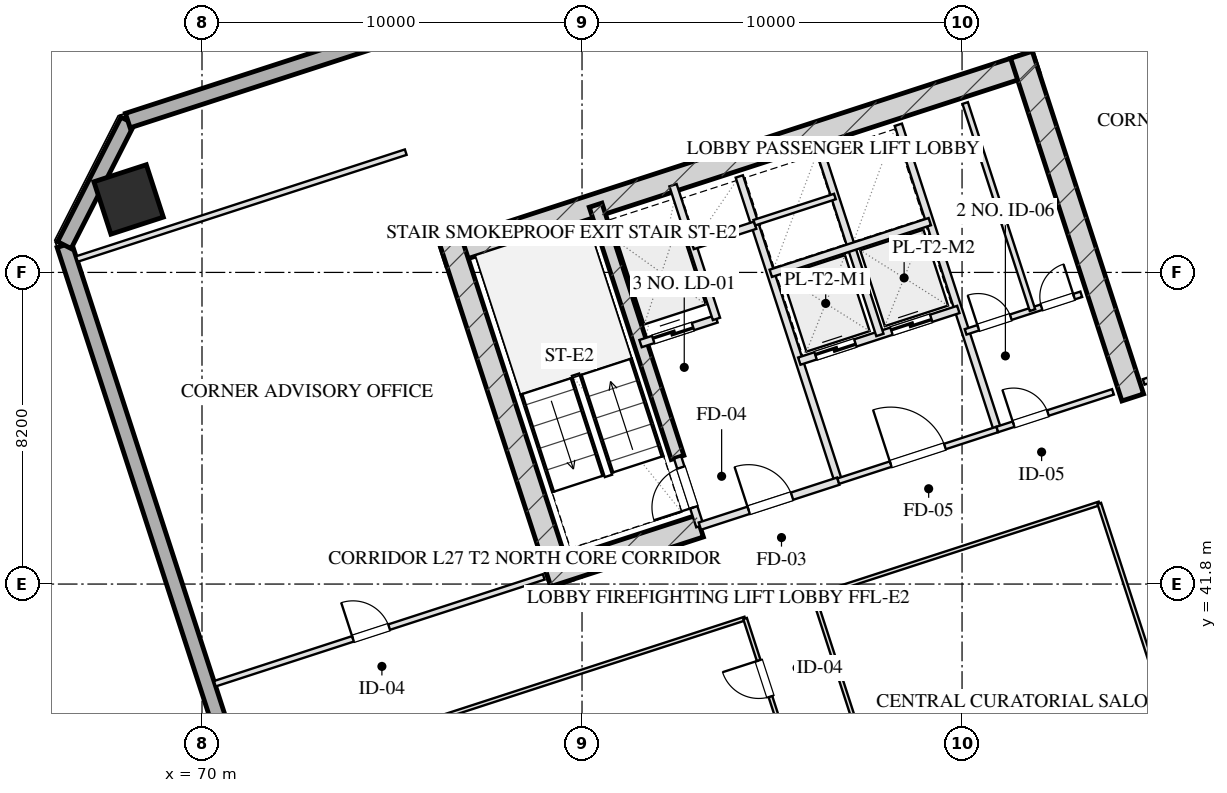
"""IFC4 building model, lengths in metres.
Left out: names, types, materials, properties, quantities, classifications, styles, units other than length and angle.
Written with IfcOpenShell. Run it as: python <this file> out.ifc"""

import sys

from ifc_helpers import new_model, si_unit, direction, frame, frame_2d, origin, origin_2d, place, context, subcontext, project, spatial, rectangle, hollow_rectangle, extrude, element, fill, save


model = new_model("IFC4")
c1 = context("Model", 3, precision=1e-05, world=origin(), true_north=direction((0.0, 1.0)))
c2 = subcontext(c1, "Body", "Model", "MODEL_VIEW")
j1 = project(units=[si_unit("LENGTHUNIT", "METRE"), si_unit("PLANEANGLEUNIT", "RADIAN")], contexts=[c1])
p1 = place(None, origin())
s1 = spatial("IfcSite", under=j1, at=p1, CompositionType="ELEMENT")
p2 = place(p1, origin())
s2 = spatial("IfcBuilding", under=s1, at=p2, CompositionType="ELEMENT")
p3 = place(p2, frame((0.0, 0.0, 106.95)))
s3 = spatial("IfcBuildingStorey", under=s2, at=p3, CompositionType="ELEMENT", Elevation=106.95)
p4 = place(p3, frame((76.344, 50.466, 0.0), z_axis=(0.0, 0.0, 1.0), x_axis=(0.951055727519, 0.309019421968, 0.0)))
e1 = element("IfcWall", 1, at=p4, inside=s3, PredefinedType="SHEAR", context=c2, shape_type="SweptSolid", body=[
    extrude(rectangle(XDim=16.4, YDim=0.6, at=frame_2d((8.2, 0.0))), origin(), (0.0, 0.0, 1.0), 3.45),
])
for number, where, z_axis, x_axis in (
    (2, (79.466, 41.828, 0.0), (0.0, 0.0, 1.0), (-0.309, 0.951, 0.0)),
    (3, (94.492, 46.71, 0.0), (0.0, 0.0, 1.0), (-0.309, 0.951, 0.0)),
):
    element("IfcWall", number, at=place(p3, frame(where, z_axis=z_axis, x_axis=x_axis)), inside=s3, PredefinedType="SHEAR", context=c2, shape_type="SweptSolid", body=[
        extrude(rectangle(XDim=9.48, YDim=0.6, at=frame_2d((4.74, 0.0))), origin(), (0.0, 0.0, 1.0), 3.45),
    ])
p5 = place(p3, frame((82.514, 45.131, 0.0), z_axis=(0.0, 0.0, 1.0), x_axis=(-0.308988790936, 0.951065679686, 0.0)))
e4 = element("IfcWall", 4, at=p5, inside=s3, PredefinedType="SHEAR", context=c2, shape_type="SweptSolid", body=[
    extrude(rectangle(XDim=6.98, YDim=0.35, at=frame_2d((3.49, 0.0))), origin(), (0.0, 0.0, 1.0), 3.45),
])
p6 = place(p3, frame((79.087, 42.021, 0.0), z_axis=(0.0, 0.0, 1.0), x_axis=(0.951062550203, 0.3089984233, 0.0)))
e5 = element("IfcWall", 5, at=p6, inside=s3, PredefinedType="SHEAR", context=c2, shape_type="SweptSolid", body=[
    extrude(rectangle(XDim=4.22, YDim=0.6, at=frame_2d((2.11, 0.0))), origin(), (0.0, 0.0, 1.0), 3.45),
])
p7 = place(p3, frame((68.069, 51.92, 0.0), z_axis=(0.0, 0.0, 1.0), x_axis=(0.951056516295, 0.309016994375, 0.0)))
e6 = element("IfcColumn", 6, at=p7, inside=s3, PredefinedType="COLUMN", context=c2, shape_type="SweptSolid", body=[
    extrude(hollow_rectangle(XDim=1.45, YDim=1.45, WallThickness=0.05, at=origin_2d()), origin(), (0.0, 0.0, 1.0), 3.451),
])
p8 = place(p3, frame((80.716, 6.59, 0.0), z_axis=(0.0, 0.0, 1.0), x_axis=(-0.309017542002, 0.95105633836, 0.0)))
e7 = element("IfcWall", 7, at=p8, inside=s3, PredefinedType="SOLIDWALL", context=c2, shape_type="SweptSolid", body=[
    extrude(rectangle(XDim=46.4, YDim=0.4, at=frame_2d((23.2, 0.0))), origin(), (0.0, 0.0, 1.0), 2.61),
])
p9 = place(p3, frame((66.377, 50.719, 0.0), z_axis=(0.0, 0.0, 1.0), x_axis=(0.454026238093, 0.890988313685, 0.0)))
e8 = element("IfcWall", 8, at=p9, inside=s3, PredefinedType="SOLIDWALL", context=c2, shape_type="SweptSolid", body=[
    extrude(rectangle(XDim=3.677, YDim=0.4, at=frame_2d((1.838, 0.0))), origin(), (0.0, 0.0, 1.0), 2.61),
])
p10 = place(p3, frame((68.047, 53.995, 0.0), z_axis=(0.0, 0.0, 1.0), x_axis=(0.95105505922, 0.309021478754, 0.0)))
e9 = element("IfcWall", 9, at=p10, inside=s3, PredefinedType="SOLIDWALL", context=c2, shape_type="SweptSolid", body=[
    extrude(rectangle(XDim=29.4, YDim=0.4, at=frame_2d((14.7, 0.0))), origin(), (0.0, 0.0, 1.0), 2.61),
])
p11 = place(p3, frame((83.101, 43.324, 0.0), z_axis=(0.0, 0.0, 1.0), x_axis=(-0.309048298632, 0.951046344356, 0.0)))
e10 = element("IfcWall", 10, at=p11, inside=s3, PredefinedType="PARTITIONING", context=c2, shape_type="SweptSolid", body=[
    extrude(rectangle(XDim=1.9, YDim=0.2, at=frame_2d((0.95, 0.0))), origin(), (0.0, 0.0, 1.0), 3.175),
])
p12 = place(p11, frame((0.52, 0.0, 0.0)))
e11 = element("IfcOpeningElement", 11, at=p12, cuts=e10, PredefinedType="OPENING", context=c2, shape_type="SweptSolid", body=[
    extrude(rectangle(XDim=1.1, YDim=2.05, at=frame_2d((0.55, 1.025))), frame((0.0, 0.11, 0.0), z_axis=(0.0, -1.0, 0.0), x_axis=(1.0, 0.0, 0.0)), (0.0, 0.0, 1.0), 0.22),
])
p13 = place(p3, frame((86.743, 44.508, 0.0), z_axis=(0.0, 0.0, 1.0), x_axis=(-0.309016001439, 0.951056838919, 0.0)))
e12 = element("IfcWall", 12, at=p13, inside=s3, PredefinedType="PARTITIONING", context=c2, shape_type="SweptSolid", body=[
    extrude(rectangle(XDim=8.43, YDim=0.2, at=frame_2d((4.215, 0.0))), origin(), (0.0, 0.0, 1.0), 3.175),
])
p14 = place(p3, frame((83.101, 43.324, 0.0), z_axis=(0.0, 0.0, 1.0), x_axis=(0.951052804469, 0.309028417967, 0.0)))
e13 = element("IfcWall", 13, at=p14, inside=s3, PredefinedType="PARTITIONING", context=c2, shape_type="SweptSolid", body=[
    extrude(rectangle(XDim=3.83, YDim=0.2, at=frame_2d((1.915, 0.0))), origin(), (0.0, 0.0, 1.0), 3.175),
])
p15 = place(p14, frame((1.35, 0.0, 0.0)))
e14 = element("IfcOpeningElement", 14, at=p15, cuts=e13, PredefinedType="OPENING", context=c2, shape_type="SweptSolid", body=[
    extrude(rectangle(XDim=1.2, YDim=2.05, at=frame_2d((0.6, 1.025))), frame((0.0, 0.11, 0.0), z_axis=(0.0, -1.0, 0.0), x_axis=(1.0, 0.0, 0.0)), (0.0, 0.0, 1.0), 0.22),
])
p16 = place(p3, frame((81.54, 48.127, 0.0), z_axis=(0.0, 0.0, 1.0), x_axis=(0.951062257173, 0.308999325213, 0.0)))
e15 = element("IfcWall", 15, at=p16, inside=s3, PredefinedType="PARTITIONING", context=c2, shape_type="SweptSolid", body=[
    extrude(rectangle(XDim=2.1, YDim=0.2, at=frame_2d((1.05, 0.0))), origin(), (0.0, 0.0, 1.0), 3.175),
])
p17 = place(p16, frame((0.35, 0.0, 0.0)))
e16 = element("IfcOpeningElement", 16, at=p17, cuts=e15, PredefinedType="OPENING", context=c2, shape_type="SweptSolid", body=[
    extrude(rectangle(XDim=1.1, YDim=2.05, at=frame_2d((0.55, 1.025))), frame((0.0, 0.11, 0.0), z_axis=(0.0, -1.0, 0.0), x_axis=(1.0, 0.0, 0.0)), (0.0, 0.0, 1.0), 0.22),
])
p18 = place(p3, frame((83.538, 48.776, 0.0), z_axis=(0.0, 0.0, 1.0), x_axis=(-0.3089935693, 0.951064127245, 0.0)))
e17 = element("IfcWall", 17, at=p18, inside=s3, PredefinedType="PARTITIONING", context=c2, shape_type="SweptSolid", body=[
    extrude(rectangle(XDim=3.7, YDim=0.2, at=frame_2d((1.85, 0.0))), origin(), (0.0, 0.0, 1.0), 3.175),
])
p19 = place(p3, frame((82.91, 50.707, 0.0), z_axis=(0.0, 0.0, 1.0), x_axis=(0.951041328149, 0.309063734775, 0.0)))
e18 = element("IfcWall", 18, at=p19, inside=s3, PredefinedType="PARTITIONING", context=c2, shape_type="SweptSolid", body=[
    extrude(rectangle(XDim=1.73, YDim=0.2, at=frame_2d((0.865, 0.0))), origin(), (0.0, 0.0, 1.0), 3.175),
])
p20 = place(p3, frame((90.928, 45.868, 0.0), z_axis=(0.0, 0.0, 1.0), x_axis=(-0.309042196757, 0.951048327176, 0.0)))
e19 = element("IfcWall", 19, at=p20, inside=s3, PredefinedType="PARTITIONING", context=c2, shape_type="SweptSolid", body=[
    extrude(rectangle(XDim=8.43, YDim=0.2, at=frame_2d((4.215, 0.0))), origin(), (0.0, 0.0, 1.0), 3.175),
])
p21 = place(p3, frame((86.743, 44.508, 0.0), z_axis=(0.0, 0.0, 1.0), x_axis=(0.951063829732, 0.308994485023, 0.0)))
e20 = element("IfcWall", 20, at=p21, inside=s3, PredefinedType="PARTITIONING", context=c2, shape_type="SweptSolid", body=[
    extrude(rectangle(XDim=4.4, YDim=0.15, at=frame_2d((2.2, 0.0))), origin(), (0.0, 0.0, 1.0), 3.175),
])
p22 = place(p21, frame((1.45, 0.0, 0.0)))
e21 = element("IfcOpeningElement", 21, at=p22, cuts=e20, PredefinedType="OPENING", context=c2, shape_type="SweptSolid", body=[
    extrude(rectangle(XDim=1.5, YDim=2.05, at=frame_2d((0.75, 1.025))), frame((0.0, 0.085, 0.0), z_axis=(0.0, -1.0, 0.0), x_axis=(1.0, 0.0, 0.0)), (0.0, 0.0, 1.0), 0.17),
])
p23 = place(p3, frame((85.718, 47.666, 0.0), z_axis=(0.0, 0.0, 1.0), x_axis=(0.951058531764, 0.30901079133, 0.0)))
e22 = element("IfcWall", 22, at=p23, inside=s3, PredefinedType="PARTITIONING", context=c2, shape_type="SweptSolid", body=[
    extrude(rectangle(XDim=4.4, YDim=0.2, at=frame_2d((2.2, 0.0))), origin(), (0.0, 0.0, 1.0), 3.175),
])
p24 = place(p23, frame((0.45, 0.0, 0.0)))
e23 = element("IfcOpeningElement", 23, at=p24, cuts=e22, PredefinedType="OPENING", context=c2, shape_type="SweptSolid", body=[
    extrude(rectangle(XDim=1.1, YDim=2.05, at=frame_2d((0.55, 1.025))), frame((0.0, 0.11, 0.0), z_axis=(0.0, -1.0, 0.0), x_axis=(1.0, 0.0, 0.0)), (0.0, 0.0, 1.0), 0.22),
])
p25 = place(p23, frame((2.55, 0.0, 0.0)))
e24 = element("IfcOpeningElement", 24, at=p25, cuts=e22, PredefinedType="OPENING", context=c2, shape_type="SweptSolid", body=[
    extrude(rectangle(XDim=1.1, YDim=2.05, at=frame_2d((0.55, 1.025))), frame((0.0, 0.11, 0.0), z_axis=(0.0, -1.0, 0.0), x_axis=(1.0, 0.0, 0.0)), (0.0, 0.0, 1.0), 0.22),
])
p26 = place(p3, frame((87.838, 48.354, 0.0), z_axis=(0.0, 0.0, 1.0), x_axis=(-0.3090093719, 0.951058992953, 0.0)))
e25 = element("IfcWall", 25, at=p26, inside=s3, PredefinedType="PARTITIONING", context=c2, shape_type="SweptSolid", body=[
    extrude(rectangle(XDim=5.11, YDim=0.2, at=frame_2d((2.555, 0.0))), origin(), (0.0, 0.0, 1.0), 3.175),
])
p27 = place(p3, frame((84.967, 49.977, 0.0), z_axis=(0.0, 0.0, 1.0), x_axis=(0.951063829732, 0.308994485023, 0.0)))
e26 = element("IfcWall", 26, at=p27, inside=s3, PredefinedType="PARTITIONING", context=c2, shape_type="SweptSolid", body=[
    extrude(rectangle(XDim=4.4, YDim=0.2, at=frame_2d((2.2, 0.0))), origin(), (0.0, 0.0, 1.0), 3.175),
])
p28 = place(p3, frame((84.534, 51.308, 0.0), z_axis=(0.0, 0.0, 1.0), x_axis=(0.951075093106, 0.308959814982, 0.0)))
e27 = element("IfcWall", 27, at=p28, inside=s3, PredefinedType="PARTITIONING", context=c2, shape_type="SweptSolid", body=[
    extrude(rectangle(XDim=2.23, YDim=0.15, at=frame_2d((1.115, 0.0))), origin(), (0.0, 0.0, 1.0), 3.175),
])
p29 = place(p3, frame((90.928, 45.868, 0.0), z_axis=(0.0, 0.0, 1.0), x_axis=(0.951059297078, 0.309008435874, 0.0)))
e28 = element("IfcWall", 28, at=p29, inside=s3, PredefinedType="PARTITIONING", context=c2, shape_type="SweptSolid", body=[
    extrude(rectangle(XDim=3.2, YDim=0.15, at=frame_2d((1.6, 0.0))), origin(), (0.0, 0.0, 1.0), 3.175),
])
p30 = place(p29, frame((0.45, 0.0, 0.0)))
e29 = element("IfcOpeningElement", 29, at=p30, cuts=e28, PredefinedType="OPENING", context=c2, shape_type="SweptSolid", body=[
    extrude(rectangle(XDim=0.95, YDim=2.05, at=frame_2d((0.475, 1.025))), frame((0.0, 0.085, 0.0), z_axis=(0.0, -1.0, 0.0), x_axis=(1.0, 0.0, 0.0)), (0.0, 0.0, 1.0), 0.17),
])
p31 = place(p3, frame((90.094, 48.436, 0.0), z_axis=(0.0, 0.0, 1.0), x_axis=(0.951066581729, 0.308986014439, 0.0)))
e30 = element("IfcWall", 30, at=p31, inside=s3, PredefinedType="PARTITIONING", context=c2, shape_type="SweptSolid", body=[
    extrude(rectangle(XDim=3.2, YDim=0.15, at=frame_2d((1.6, 0.0))), origin(), (0.0, 0.0, 1.0), 3.175),
])
p32 = place(p31, frame((0.35, 0.0, 0.0)))
e31 = element("IfcOpeningElement", 31, at=p32, cuts=e30, PredefinedType="OPENING", context=c2, shape_type="SweptSolid", body=[
    extrude(rectangle(XDim=0.9, YDim=2.05, at=frame_2d((0.45, 1.025))), frame((0.0, 0.085, 0.0), z_axis=(0.0, -1.0, 0.0), x_axis=(1.0, 0.0, 0.0)), (0.0, 0.0, 1.0), 0.17),
])
p33 = place(p31, frame((2.1, 0.0, 0.0)))
e32 = element("IfcOpeningElement", 32, at=p33, cuts=e30, PredefinedType="OPENING", context=c2, shape_type="SweptSolid", body=[
    extrude(rectangle(XDim=0.9, YDim=2.05, at=frame_2d((0.45, 1.025))), frame((0.0, 0.085, 0.0), z_axis=(0.0, -1.0, 0.0), x_axis=(1.0, 0.0, 0.0)), (0.0, 0.0, 1.0), 0.17),
])
p34 = place(p3, frame((91.853, 49.007, 0.0), z_axis=(0.0, 0.0, 1.0), x_axis=(-0.309022487551, 0.951054731437, 0.0)))
e33 = element("IfcWall", 33, at=p34, inside=s3, PredefinedType="PARTITIONING", context=c2, shape_type="SweptSolid", body=[
    extrude(rectangle(XDim=5.73, YDim=0.15, at=frame_2d((2.865, 0.0))), origin(), (0.0, 0.0, 1.0), 3.175),
])
p35 = place(p3, frame((66.707, 50.352, 0.0), z_axis=(0.0, 0.0, 1.0), x_axis=(0.951057133767, 0.309015093986, 0.0)))
e34 = element("IfcWall", 34, at=p35, inside=s3, PredefinedType="PARTITIONING", context=c2, shape_type="SweptSolid", body=[
    extrude(rectangle(XDim=9.1, YDim=0.15, at=frame_2d((4.55, 0.0))), origin(), (0.0, 0.0, 1.0), 3.175),
])
p36 = place(p3, frame((70.338, 39.177, 0.0), z_axis=(0.0, 0.0, 1.0), x_axis=(0.951059695568, 0.309007209409, 0.0)))
e35 = element("IfcWall", 35, at=p36, inside=s3, PredefinedType="PARTITIONING", context=c2, shape_type="SweptSolid", body=[
    extrude(rectangle(XDim=9.1, YDim=0.15, at=frame_2d((4.55, 0.0))), origin(), (0.0, 0.0, 1.0), 3.175),
])
p37 = place(p36, frame((3.822, 0.0, 0.0)))
e36 = element("IfcOpeningElement", 36, at=p37, cuts=e35, PredefinedType="OPENING", context=c2, shape_type="SweptSolid", body=[
    extrude(rectangle(XDim=1.0, YDim=2.05, at=frame_2d((0.5, 1.025))), frame((0.0, 0.085, 0.0), z_axis=(0.0, -1.0, 0.0), x_axis=(1.0, 0.0, 0.0)), (0.0, 0.0, 1.0), 0.17),
])
p38 = place(p3, frame((94.78, 47.119, 0.0), z_axis=(0.0, 0.0, 1.0), x_axis=(0.951054329824, 0.309023723562, 0.0)))
e37 = element("IfcWall", 37, at=p38, inside=s3, PredefinedType="PARTITIONING", context=c2, shape_type="SweptSolid", body=[
    extrude(rectangle(XDim=8.5, YDim=0.15, at=frame_2d((4.25, 0.0))), origin(), (0.0, 0.0, 1.0), 3.175),
])
p39 = place(p38, frame((3.57, 0.0, 0.0)))
e38 = element("IfcOpeningElement", 38, at=p39, cuts=e37, PredefinedType="OPENING", context=c2, shape_type="SweptSolid", body=[
    extrude(rectangle(XDim=1.0, YDim=2.05, at=frame_2d((0.5, 1.025))), frame((0.0, 0.085, 0.0), z_axis=(0.0, -1.0, 0.0), x_axis=(1.0, 0.0, 0.0)), (0.0, 0.0, 1.0), 0.17),
])
p40 = place(p3, frame((71.166, 36.629, 0.0), z_axis=(0.0, 0.0, 1.0), x_axis=(0.951056688031, 0.309016465825, 0.0)))
e39 = element("IfcWall", 39, at=p40, inside=s3, PredefinedType="MOVABLE", context=c2, shape_type="SweptSolid", body=[
    extrude(rectangle(XDim=13.8, YDim=0.1, at=frame_2d((6.9, 0.0))), origin(), (0.0, 0.0, 1.0), 3.175),
])
p41 = place(p3, frame((86.097, 41.48, 0.0), z_axis=(0.0, 0.0, 1.0), x_axis=(0.951060182336, 0.309005711233, 0.0)))
e40 = element("IfcWall", 40, at=p41, inside=s3, PredefinedType="MOVABLE", context=c2, shape_type="SweptSolid", body=[
    extrude(rectangle(XDim=7.9, YDim=0.1, at=frame_2d((3.95, 0.0))), origin(), (0.0, 0.0, 1.0), 3.175),
])
p42 = place(p3, frame((89.433, 25.067, 0.0), z_axis=(0.0, 0.0, 1.0), x_axis=(-0.30901773025, 0.951056277195, 0.0)))
e41 = element("IfcWall", 41, at=p42, inside=s3, PredefinedType="MOVABLE", context=c2, shape_type="SweptSolid", body=[
    extrude(rectangle(XDim=16.64, YDim=0.1, at=frame_2d((8.32, 0.0))), origin(), (0.0, 0.0, 1.0), 3.175),
])
p43 = place(p42, frame((1.16, 0.0, 0.0)))
e42 = element("IfcOpeningElement", 42, at=p43, cuts=e41, PredefinedType="OPENING", context=c2, shape_type="SweptSolid", body=[
    extrude(rectangle(XDim=1.05, YDim=2.05, at=frame_2d((0.525, 1.025))), frame((0.0, 0.06, 0.0), z_axis=(0.0, -1.0, 0.0), x_axis=(1.0, 0.0, 0.0)), (0.0, 0.0, 1.0), 0.12),
])
p44 = place(p42, frame((6.16, 0.0, 0.0)))
e43 = element("IfcOpeningElement", 43, at=p44, cuts=e41, PredefinedType="OPENING", context=c2, shape_type="SweptSolid", body=[
    extrude(rectangle(XDim=1.0, YDim=2.05, at=frame_2d((0.5, 1.025))), frame((0.0, 0.06, 0.0), z_axis=(0.0, -1.0, 0.0), x_axis=(1.0, 0.0, 0.0)), (0.0, 0.0, 1.0), 0.12),
])
p45 = place(p42, frame((10.16, 0.0, 0.0)))
e44 = element("IfcOpeningElement", 44, at=p45, cuts=e41, PredefinedType="OPENING", context=c2, shape_type="SweptSolid", body=[
    extrude(rectangle(XDim=1.0, YDim=2.05, at=frame_2d((0.5, 1.025))), frame((0.0, 0.06, 0.0), z_axis=(0.0, -1.0, 0.0), x_axis=(1.0, 0.0, 0.0)), (0.0, 0.0, 1.0), 0.12),
])
p46 = place(p42, frame((14.48, 0.0, 0.0)))
e45 = element("IfcOpeningElement", 45, at=p46, cuts=e41, PredefinedType="OPENING", context=c2, shape_type="SweptSolid", body=[
    extrude(rectangle(XDim=1.0, YDim=2.05, at=frame_2d((0.5, 1.025))), frame((0.0, 0.06, 0.0), z_axis=(0.0, -1.0, 0.0), x_axis=(1.0, 0.0, 0.0)), (0.0, 0.0, 1.0), 0.12),
])
p47 = place(p3, frame((91.24, 25.655, 0.0), z_axis=(0.0, 0.0, 1.0), x_axis=(-0.30901773025, 0.951056277195, 0.0)))
e46 = element("IfcWall", 46, at=p47, inside=s3, PredefinedType="MOVABLE", context=c2, shape_type="SweptSolid", body=[
    extrude(rectangle(XDim=16.64, YDim=0.1, at=frame_2d((8.32, 0.0))), origin(), (0.0, 0.0, 1.0), 3.175),
])
p48 = place(p47, frame((3.204, 0.0, 0.0)))
e47 = element("IfcOpeningElement", 47, at=p48, cuts=e46, PredefinedType="OPENING", context=c2, shape_type="SweptSolid", body=[
    extrude(rectangle(XDim=1.1, YDim=2.05, at=frame_2d((0.55, 1.025))), frame((0.0, 0.06, 0.0), z_axis=(0.0, -1.0, 0.0), x_axis=(1.0, 0.0, 0.0)), (0.0, 0.0, 1.0), 0.12),
])
p49 = place(p47, frame((11.404, 0.0, 0.0)))
e48 = element("IfcOpeningElement", 48, at=p49, cuts=e46, PredefinedType="OPENING", context=c2, shape_type="SweptSolid", body=[
    extrude(rectangle(XDim=1.1, YDim=2.05, at=frame_2d((0.55, 1.025))), frame((0.0, 0.06, 0.0), z_axis=(0.0, -1.0, 0.0), x_axis=(1.0, 0.0, 0.0)), (0.0, 0.0, 1.0), 0.12),
])
p50 = place(p3, frame((98.753, 28.096, 0.0), z_axis=(0.0, 0.0, 1.0), x_axis=(-0.30901773025, 0.951056277195, 0.0)))
e49 = element("IfcWall", 49, at=p50, inside=s3, PredefinedType="MOVABLE", context=c2, shape_type="SweptSolid", body=[
    extrude(rectangle(XDim=16.64, YDim=0.1, at=frame_2d((8.32, 0.0))), origin(), (0.0, 0.0, 1.0), 3.175),
])
p51 = place(p12, origin())
e50 = element("IfcDoor", 50, at=p51, inside=s3, OperationType="SINGLE_SWING_LEFT", PredefinedType="DOOR", context=c2, shape_type="SweptSolid", body=[
    extrude(rectangle(XDim=1.1, YDim=2.05, at=frame_2d((0.55, 1.025))), frame((0.0, 0.025, 0.0), z_axis=(0.0, -1.0, 0.0), x_axis=(1.0, 0.0, 0.0)), (0.0, 0.0, 1.0), 0.05),
])
fill(e11, e50)
p52 = place(p15, origin())
e51 = element("IfcDoor", 51, at=p52, inside=s3, OperationType="SINGLE_SWING_LEFT", PredefinedType="DOOR", context=c2, shape_type="SweptSolid", body=[
    extrude(rectangle(XDim=1.2, YDim=2.05, at=frame_2d((0.6, 1.025))), frame((0.0, 0.025, 0.0), z_axis=(0.0, -1.0, 0.0), x_axis=(1.0, 0.0, 0.0)), (0.0, 0.0, 1.0), 0.05),
])
fill(e14, e51)
p53 = place(p17, origin())
e52 = element("IfcDoor", 52, at=p53, inside=s3, OperationType="DOUBLE_DOOR_SLIDING", PredefinedType="DOOR", context=c2, shape_type="SweptSolid", body=[
    extrude(rectangle(XDim=1.1, YDim=2.05, at=frame_2d((0.55, 1.025))), frame((0.0, 0.025, 0.0), z_axis=(0.0, -1.0, 0.0), x_axis=(1.0, 0.0, 0.0)), (0.0, 0.0, 1.0), 0.05),
])
fill(e16, e52)
p54 = place(p22, origin())
e53 = element("IfcDoor", 53, at=p54, inside=s3, OperationType="SINGLE_SWING_LEFT", PredefinedType="DOOR", context=c2, shape_type="SweptSolid", body=[
    extrude(rectangle(XDim=1.5, YDim=2.05, at=frame_2d((0.75, 1.025))), frame((0.0, 0.025, 0.0), z_axis=(0.0, -1.0, 0.0), x_axis=(1.0, 0.0, 0.0)), (0.0, 0.0, 1.0), 0.05),
])
fill(e21, e53)
p55 = place(p24, origin())
e54 = element("IfcDoor", 54, at=p55, inside=s3, OperationType="DOUBLE_DOOR_SLIDING", PredefinedType="DOOR", context=c2, shape_type="SweptSolid", body=[
    extrude(rectangle(XDim=1.1, YDim=2.05, at=frame_2d((0.55, 1.025))), frame((0.0, 0.025, 0.0), z_axis=(0.0, -1.0, 0.0), x_axis=(1.0, 0.0, 0.0)), (0.0, 0.0, 1.0), 0.05),
])
fill(e23, e54)
p56 = place(p25, origin())
e55 = element("IfcDoor", 55, at=p56, inside=s3, OperationType="DOUBLE_DOOR_SLIDING", PredefinedType="DOOR", context=c2, shape_type="SweptSolid", body=[
    extrude(rectangle(XDim=1.1, YDim=2.05, at=frame_2d((0.55, 1.025))), frame((0.0, 0.025, 0.0), z_axis=(0.0, -1.0, 0.0), x_axis=(1.0, 0.0, 0.0)), (0.0, 0.0, 1.0), 0.05),
])
fill(e24, e55)
p57 = place(p30, origin())
e56 = element("IfcDoor", 56, at=p57, inside=s3, OperationType="SINGLE_SWING_LEFT", PredefinedType="DOOR", context=c2, shape_type="SweptSolid", body=[
    extrude(rectangle(XDim=0.95, YDim=2.05, at=frame_2d((0.475, 1.025))), frame((0.0, 0.025, 0.0), z_axis=(0.0, -1.0, 0.0), x_axis=(1.0, 0.0, 0.0)), (0.0, 0.0, 1.0), 0.05),
])
fill(e29, e56)
p58 = place(p32, origin())
e57 = element("IfcDoor", 57, at=p58, inside=s3, OperationType="SINGLE_SWING_LEFT", PredefinedType="DOOR", context=c2, shape_type="SweptSolid", body=[
    extrude(rectangle(XDim=0.9, YDim=2.05, at=frame_2d((0.45, 1.025))), frame((0.0, 0.025, 0.0), z_axis=(0.0, -1.0, 0.0), x_axis=(1.0, 0.0, 0.0)), (0.0, 0.0, 1.0), 0.05),
])
fill(e31, e57)
p59 = place(p33, origin())
e58 = element("IfcDoor", 58, at=p59, inside=s3, OperationType="SINGLE_SWING_RIGHT", PredefinedType="DOOR", context=c2, shape_type="SweptSolid", body=[
    extrude(rectangle(XDim=0.9, YDim=2.05, at=frame_2d((0.45, 1.025))), frame((0.0, 0.025, 0.0), z_axis=(0.0, -1.0, 0.0), x_axis=(1.0, 0.0, 0.0)), (0.0, 0.0, 1.0), 0.05),
])
fill(e32, e58)
p60 = place(p37, origin())
e59 = element("IfcDoor", 59, at=p60, inside=s3, OperationType="SINGLE_SWING_LEFT", PredefinedType="DOOR", context=c2, shape_type="SweptSolid", body=[
    extrude(rectangle(XDim=1.0, YDim=2.05, at=frame_2d((0.5, 1.025))), frame((0.0, 0.025, 0.0), z_axis=(0.0, -1.0, 0.0), x_axis=(1.0, 0.0, 0.0)), (0.0, 0.0, 1.0), 0.05),
])
fill(e36, e59)
p61 = place(p46, origin())
e60 = element("IfcDoor", 60, at=p61, inside=s3, OperationType="SINGLE_SWING_RIGHT", PredefinedType="DOOR", context=c2, shape_type="SweptSolid", body=[
    extrude(rectangle(XDim=1.0, YDim=2.05, at=frame_2d((0.5, 1.025))), frame((0.0, 0.025, 0.0), z_axis=(0.0, -1.0, 0.0), x_axis=(1.0, 0.0, 0.0)), (0.0, 0.0, 1.0), 0.05),
])
fill(e45, e60)
save(model, sys.argv[1])
